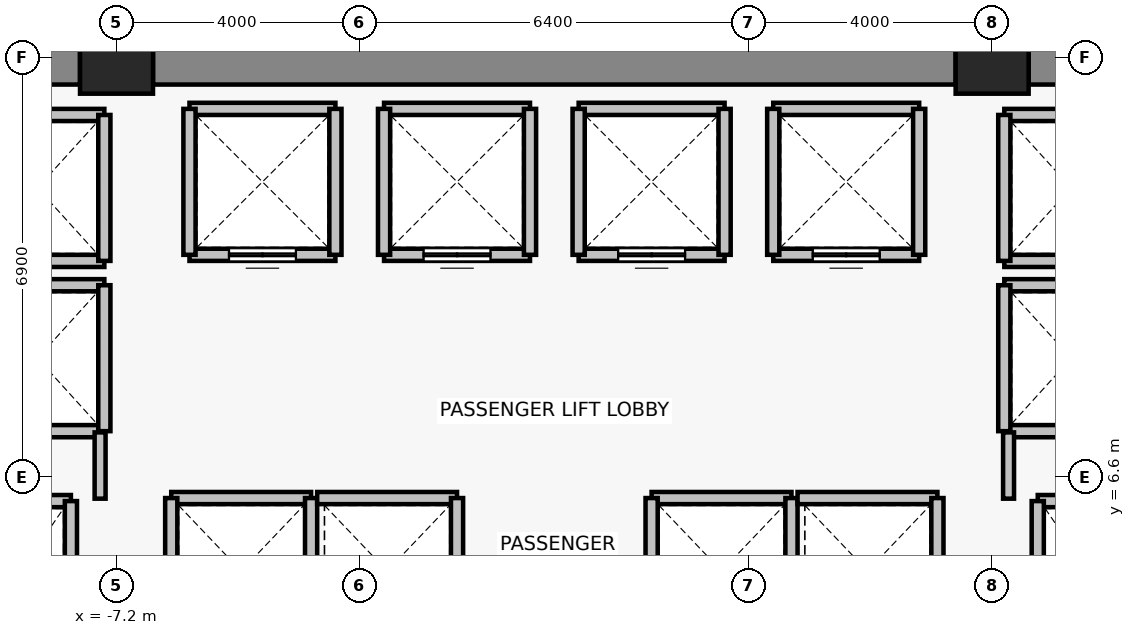
"""IFC4 building model, lengths in metres.
Left out: names, types, materials, properties, quantities, classifications, styles, units other than length and angle.
Written with IfcOpenShell. Run it as: python <this file> out.ifc"""

import sys

from ifc_helpers import new_model, si_unit, direction, frame, frame_2d, origin, origin_2d, place, context, subcontext, project, spatial, rectangle, extrude, source, transform, mapped, element, fill, save


model = new_model("IFC4")
c1 = context("Model", 3, precision=1e-05, world=origin(), true_north=direction((0.0, 1.0)))
c2 = subcontext(c1, "Body", "Model", "MODEL_VIEW")
j1 = project(units=[si_unit("LENGTHUNIT", "METRE"), si_unit("PLANEANGLEUNIT", "RADIAN")], contexts=[c1])
p1 = place(None, origin())
s1 = spatial("IfcSite", under=j1, at=p1, CompositionType="ELEMENT")
p2 = place(p1, origin())
s2 = spatial("IfcBuilding", under=s1, at=p2, CompositionType="ELEMENT")
p3 = place(p2, frame((0.0, 0.0, 70.3)))
s3 = spatial("IfcBuildingStorey", under=s2, at=p3, CompositionType="ELEMENT", Elevation=70.3)
for number, where, z_axis, x_axis in (
    (1, (-7.2, 13.5, 0.0), (0.0, 0.0, 1.0), (1.0, 0.0, 0.0)),
    (2, (7.2, 13.5, 0.0), (0.0, 0.0, 1.0), (1.0, 0.0, 0.0)),
):
    element("IfcColumn", number, at=place(p3, frame(where, z_axis=z_axis, x_axis=x_axis)), inside=s3, PredefinedType="COLUMN", context=c2, shape_type="SweptSolid", body=[
        extrude(rectangle(XDim=1.2, YDim=1.2, at=origin_2d()), origin(), (0.0, 0.0, 1.0), 3.3),
    ])
p4 = place(p3, frame((-13.8, 13.5, 0.0), z_axis=(0.0, 0.0, 1.0), x_axis=(1.0, 0.0, 0.0)))
e3 = element("IfcWall", 3, at=p4, inside=s3, PredefinedType="SHEAR", context=c2, shape_type="SweptSolid", body=[
    extrude(rectangle(XDim=6.0, YDim=0.9, at=frame_2d((3.0, 0.0))), origin(), (0.0, 0.0, 1.0), 3.075),
])
p5 = place(p3, frame((-6.6, 13.5, 0.0), z_axis=(0.0, 0.0, 1.0), x_axis=(1.0, 0.0, 0.0)))
e4 = element("IfcWall", 4, at=p5, inside=s3, PredefinedType="SHEAR", context=c2, shape_type="SweptSolid", body=[
    extrude(rectangle(XDim=13.2, YDim=0.9, at=frame_2d((6.6, 0.0))), origin(), (0.0, 0.0, 1.0), 3.075),
])
p6 = place(p3, frame((7.8, 13.5, 0.0), z_axis=(0.0, 0.0, 1.0), x_axis=(1.0, 0.0, 0.0)))
e5 = element("IfcWall", 5, at=p6, inside=s3, PredefinedType="SHEAR", context=c2, shape_type="SweptSolid", body=[
    extrude(rectangle(XDim=6.0, YDim=0.9, at=frame_2d((3.0, 0.0))), origin(), (0.0, 0.0, 1.0), 3.075),
])
p7 = place(p3, frame((-9.95, 6.2, 0.0), z_axis=(0.0, 0.0, 1.0), x_axis=(1.0, 0.0, 0.0)))
e6 = element("IfcWall", 6, at=p7, inside=s3, PredefinedType="SOLIDWALL", context=c2, shape_type="SweptSolid", body=[
    extrude(rectangle(XDim=2.0, YDim=0.2, at=frame_2d((1.0, 0.0))), origin(), (0.0, 0.0, 1.0), 3.075),
])
p8 = place(p3, frame((-7.95, 6.2, 0.0), z_axis=(0.0, 0.0, 1.0), x_axis=(0.0, -1.0, 0.0)))
e7 = element("IfcWall", 7, at=p8, inside=s3, PredefinedType="SOLIDWALL", context=c2, shape_type="SweptSolid", body=[
    extrude(rectangle(XDim=2.8, YDim=0.2, at=frame_2d((1.4, 0.0))), origin(), (0.0, 0.0, 1.0), 3.075),
])
p9 = place(p3, frame((7.95, 6.2, 0.0), z_axis=(0.0, 0.0, 1.0), x_axis=(1.0, 0.0, 0.0)))
e8 = element("IfcWall", 8, at=p9, inside=s3, PredefinedType="SOLIDWALL", context=c2, shape_type="SweptSolid", body=[
    extrude(rectangle(XDim=2.0, YDim=0.2, at=frame_2d((1.0, 0.0))), origin(), (0.0, 0.0, 1.0), 3.075),
])
p10 = place(p3, frame((7.95, 3.4, 0.0), z_axis=(0.0, 0.0, 1.0), x_axis=(0.0, 1.0, 0.0)))
e9 = element("IfcWall", 9, at=p10, inside=s3, PredefinedType="SOLIDWALL", context=c2, shape_type="SweptSolid", body=[
    extrude(rectangle(XDim=2.8, YDim=0.2, at=frame_2d((1.4, 0.0))), origin(), (0.0, 0.0, 1.0), 3.075),
])
p11 = place(p3, frame((-3.6, 10.25, 0.0), z_axis=(0.0, 0.0, 1.0), x_axis=(-1.0, 0.0, 0.0)))
e10 = element("IfcWall", 10, at=p11, inside=s3, PredefinedType="SOLIDWALL", context=c2, shape_type="SweptSolid", body=[
    extrude(rectangle(XDim=2.4, YDim=0.2, at=frame_2d((1.2, 0.0))), origin(), (0.0, 0.0, 1.0), 3.075),
])
p12 = place(p11, frame((0.65, 0.0, 0.0)))
e11 = element("IfcOpeningElement", 11, at=p12, cuts=e10, PredefinedType="OPENING", context=c2, shape_type="SweptSolid", body=[
    extrude(rectangle(XDim=1.1, YDim=2.2, at=frame_2d((0.55, 1.1))), frame((0.0, 0.11, 0.0), z_axis=(0.0, -1.0, 0.0), x_axis=(1.0, 0.0, 0.0)), (0.0, 0.0, 1.0), 0.22),
])
for number, where, z_axis, x_axis in (
    (12, (-6.0, 12.65, 0.0), (0.0, 0.0, 1.0), (1.0, 0.0, 0.0)),
    (13, (-6.0, 10.25, 0.0), (0.0, 0.0, 1.0), (0.0, 1.0, 0.0)),
    (14, (-3.6, 12.65, 0.0), (0.0, 0.0, 1.0), (0.0, -1.0, 0.0)),
):
    element("IfcWall", number, at=place(p3, frame(where, z_axis=z_axis, x_axis=x_axis)), inside=s3, PredefinedType="SOLIDWALL", context=c2, shape_type="SweptSolid", body=[
        extrude(rectangle(XDim=2.4, YDim=0.2, at=frame_2d((1.2, 0.0))), origin(), (0.0, 0.0, 1.0), 3.075),
    ])
p13 = place(p3, frame((-0.4, 10.25, 0.0), z_axis=(0.0, 0.0, 1.0), x_axis=(-1.0, 0.0, 0.0)))
e15 = element("IfcWall", 15, at=p13, inside=s3, PredefinedType="SOLIDWALL", context=c2, shape_type="SweptSolid", body=[
    extrude(rectangle(XDim=2.4, YDim=0.2, at=frame_2d((1.2, 0.0))), origin(), (0.0, 0.0, 1.0), 3.075),
])
p14 = place(p13, frame((0.65, 0.0, 0.0)))
e16 = element("IfcOpeningElement", 16, at=p14, cuts=e15, PredefinedType="OPENING", context=c2, shape_type="SweptSolid", body=[
    extrude(rectangle(XDim=1.1, YDim=2.2, at=frame_2d((0.55, 1.1))), frame((0.0, 0.11, 0.0), z_axis=(0.0, -1.0, 0.0), x_axis=(1.0, 0.0, 0.0)), (0.0, 0.0, 1.0), 0.22),
])
p15 = place(p3, frame((-2.8, 12.65, 0.0), z_axis=(0.0, 0.0, 1.0), x_axis=(1.0, 0.0, 0.0)))
e17 = element("IfcWall", 17, at=p15, inside=s3, PredefinedType="SOLIDWALL", context=c2, shape_type="SweptSolid", body=[
    extrude(rectangle(XDim=2.4, YDim=0.2, at=frame_2d((1.2, 0.0))), origin(), (0.0, 0.0, 1.0), 3.075),
])
for number, where, z_axis, x_axis in (
    (18, (-2.8, 10.25, 0.0), (0.0, 0.0, 1.0), (0.0, 1.0, 0.0)),
    (19, (-0.4, 12.65, 0.0), (0.0, 0.0, 1.0), (0.0, -1.0, 0.0)),
):
    element("IfcWall", number, at=place(p3, frame(where, z_axis=z_axis, x_axis=x_axis)), inside=s3, PredefinedType="SOLIDWALL", context=c2, shape_type="SweptSolid", body=[
        extrude(rectangle(XDim=2.4, YDim=0.2, at=frame_2d((1.2, 0.0))), origin(), (0.0, 0.0, 1.0), 3.075),
    ])
p16 = place(p3, frame((2.8, 10.25, 0.0), z_axis=(0.0, 0.0, 1.0), x_axis=(-1.0, 0.0, 0.0)))
e20 = element("IfcWall", 20, at=p16, inside=s3, PredefinedType="SOLIDWALL", context=c2, shape_type="SweptSolid", body=[
    extrude(rectangle(XDim=2.4, YDim=0.2, at=frame_2d((1.2, 0.0))), origin(), (0.0, 0.0, 1.0), 3.075),
])
p17 = place(p16, frame((0.65, 0.0, 0.0)))
e21 = element("IfcOpeningElement", 21, at=p17, cuts=e20, PredefinedType="OPENING", context=c2, shape_type="SweptSolid", body=[
    extrude(rectangle(XDim=1.1, YDim=2.2, at=frame_2d((0.55, 1.1))), frame((0.0, 0.11, 0.0), z_axis=(0.0, -1.0, 0.0), x_axis=(1.0, 0.0, 0.0)), (0.0, 0.0, 1.0), 0.22),
])
p18 = place(p3, frame((0.4, 12.65, 0.0), z_axis=(0.0, 0.0, 1.0), x_axis=(1.0, 0.0, 0.0)))
e22 = element("IfcWall", 22, at=p18, inside=s3, PredefinedType="SOLIDWALL", context=c2, shape_type="SweptSolid", body=[
    extrude(rectangle(XDim=2.4, YDim=0.2, at=frame_2d((1.2, 0.0))), origin(), (0.0, 0.0, 1.0), 3.075),
])
for number, where, z_axis, x_axis in (
    (23, (0.4, 10.25, 0.0), (0.0, 0.0, 1.0), (0.0, 1.0, 0.0)),
    (24, (2.8, 12.65, 0.0), (0.0, 0.0, 1.0), (0.0, -1.0, 0.0)),
):
    element("IfcWall", number, at=place(p3, frame(where, z_axis=z_axis, x_axis=x_axis)), inside=s3, PredefinedType="SOLIDWALL", context=c2, shape_type="SweptSolid", body=[
        extrude(rectangle(XDim=2.4, YDim=0.2, at=frame_2d((1.2, 0.0))), origin(), (0.0, 0.0, 1.0), 3.075),
    ])
p19 = place(p3, frame((6.0, 10.25, 0.0), z_axis=(0.0, 0.0, 1.0), x_axis=(-1.0, 0.0, 0.0)))
e25 = element("IfcWall", 25, at=p19, inside=s3, PredefinedType="SOLIDWALL", context=c2, shape_type="SweptSolid", body=[
    extrude(rectangle(XDim=2.4, YDim=0.2, at=frame_2d((1.2, 0.0))), origin(), (0.0, 0.0, 1.0), 3.075),
])
p20 = place(p19, frame((0.65, 0.0, 0.0)))
e26 = element("IfcOpeningElement", 26, at=p20, cuts=e25, PredefinedType="OPENING", context=c2, shape_type="SweptSolid", body=[
    extrude(rectangle(XDim=1.1, YDim=2.2, at=frame_2d((0.55, 1.1))), frame((0.0, 0.11, 0.0), z_axis=(0.0, -1.0, 0.0), x_axis=(1.0, 0.0, 0.0)), (0.0, 0.0, 1.0), 0.22),
])
for number, where, z_axis, x_axis in (
    (27, (3.6, 12.65, 0.0), (0.0, 0.0, 1.0), (1.0, 0.0, 0.0)),
    (28, (3.6, 10.25, 0.0), (0.0, 0.0, 1.0), (0.0, 1.0, 0.0)),
    (29, (6.0, 12.65, 0.0), (0.0, 0.0, 1.0), (0.0, -1.0, 0.0)),
):
    element("IfcWall", number, at=place(p3, frame(where, z_axis=z_axis, x_axis=x_axis)), inside=s3, PredefinedType="SOLIDWALL", context=c2, shape_type="SweptSolid", body=[
        extrude(rectangle(XDim=2.4, YDim=0.2, at=frame_2d((1.2, 0.0))), origin(), (0.0, 0.0, 1.0), 3.075),
    ])
p21 = place(p3, frame((-6.3, 6.25, 0.0), z_axis=(0.0, 0.0, 1.0), x_axis=(1.0, 0.0, 0.0)))
e30 = element("IfcWall", 30, at=p21, inside=s3, PredefinedType="SOLIDWALL", context=c2, shape_type="SweptSolid", body=[
    extrude(rectangle(XDim=2.3, YDim=0.2, at=frame_2d((1.15, 0.0))), origin(), (0.0, 0.0, 1.0), 3.075),
])
for number, where, z_axis, x_axis in (
    (31, (-6.3, 3.85, 0.0), (0.0, 0.0, 1.0), (0.0, 1.0, 0.0)),
    (32, (-4.0, 6.25, 0.0), (0.0, 0.0, 1.0), (0.0, -1.0, 0.0)),
):
    element("IfcWall", number, at=place(p3, frame(where, z_axis=z_axis, x_axis=x_axis)), inside=s3, PredefinedType="SOLIDWALL", context=c2, shape_type="SweptSolid", body=[
        extrude(rectangle(XDim=2.4, YDim=0.2, at=frame_2d((1.2, 0.0))), origin(), (0.0, 0.0, 1.0), 3.075),
    ])
p22 = place(p3, frame((-3.9, 6.25, 0.0), z_axis=(0.0, 0.0, 1.0), x_axis=(1.0, 0.0, 0.0)))
e33 = element("IfcWall", 33, at=p22, inside=s3, PredefinedType="SOLIDWALL", context=c2, shape_type="SweptSolid", body=[
    extrude(rectangle(XDim=2.3, YDim=0.2, at=frame_2d((1.15, 0.0))), origin(), (0.0, 0.0, 1.0), 3.075),
])
p23 = place(p3, frame((-1.6, 6.25, 0.0), z_axis=(0.0, 0.0, 1.0), x_axis=(0.0, -1.0, 0.0)))
e34 = element("IfcWall", 34, at=p23, inside=s3, PredefinedType="SOLIDWALL", context=c2, shape_type="SweptSolid", body=[
    extrude(rectangle(XDim=2.4, YDim=0.2, at=frame_2d((1.2, 0.0))), origin(), (0.0, 0.0, 1.0), 3.075),
])
p24 = place(p3, frame((1.6, 6.25, 0.0), z_axis=(0.0, 0.0, 1.0), x_axis=(1.0, 0.0, 0.0)))
e35 = element("IfcWall", 35, at=p24, inside=s3, PredefinedType="SOLIDWALL", context=c2, shape_type="SweptSolid", body=[
    extrude(rectangle(XDim=2.3, YDim=0.2, at=frame_2d((1.15, 0.0))), origin(), (0.0, 0.0, 1.0), 3.075),
])
for number, where, z_axis, x_axis in (
    (36, (1.6, 3.85, 0.0), (0.0, 0.0, 1.0), (0.0, 1.0, 0.0)),
    (37, (3.9, 6.25, 0.0), (0.0, 0.0, 1.0), (0.0, -1.0, 0.0)),
):
    element("IfcWall", number, at=place(p3, frame(where, z_axis=z_axis, x_axis=x_axis)), inside=s3, PredefinedType="SOLIDWALL", context=c2, shape_type="SweptSolid", body=[
        extrude(rectangle(XDim=2.4, YDim=0.2, at=frame_2d((1.2, 0.0))), origin(), (0.0, 0.0, 1.0), 3.075),
    ])
p25 = place(p3, frame((4.0, 6.25, 0.0), z_axis=(0.0, 0.0, 1.0), x_axis=(1.0, 0.0, 0.0)))
e38 = element("IfcWall", 38, at=p25, inside=s3, PredefinedType="SOLIDWALL", context=c2, shape_type="SweptSolid", body=[
    extrude(rectangle(XDim=2.3, YDim=0.2, at=frame_2d((1.15, 0.0))), origin(), (0.0, 0.0, 1.0), 3.075),
])
p26 = place(p3, frame((6.3, 6.25, 0.0), z_axis=(0.0, 0.0, 1.0), x_axis=(0.0, -1.0, 0.0)))
e39 = element("IfcWall", 39, at=p26, inside=s3, PredefinedType="SOLIDWALL", context=c2, shape_type="SweptSolid", body=[
    extrude(rectangle(XDim=2.4, YDim=0.2, at=frame_2d((1.2, 0.0))), origin(), (0.0, 0.0, 1.0), 3.075),
])
for number, where, z_axis, x_axis in (
    (40, (-7.4, 7.35, 0.0), (0.0, 0.0, 1.0), (-1.0, 0.0, 0.0)),
    (41, (-9.6, 9.75, 0.0), (0.0, 0.0, 1.0), (1.0, 0.0, 0.0)),
):
    element("IfcWall", number, at=place(p3, frame(where, z_axis=z_axis, x_axis=x_axis)), inside=s3, PredefinedType="SOLIDWALL", context=c2, shape_type="SweptSolid", body=[
        extrude(rectangle(XDim=2.2, YDim=0.2, at=frame_2d((1.1, 0.0))), origin(), (0.0, 0.0, 1.0), 2.465),
    ])
p27 = place(p3, frame((-7.4, 9.75, 0.0), z_axis=(0.0, 0.0, 1.0), x_axis=(0.0, -1.0, 0.0)))
e42 = element("IfcWall", 42, at=p27, inside=s3, PredefinedType="SOLIDWALL", context=c2, shape_type="SweptSolid", body=[
    extrude(rectangle(XDim=2.4, YDim=0.2, at=frame_2d((1.2, 0.0))), origin(), (0.0, 0.0, 1.0), 2.465),
])
for number, where, z_axis, x_axis in (
    (43, (-7.4, 10.15, 0.0), (0.0, 0.0, 1.0), (-1.0, 0.0, 0.0)),
    (44, (-9.6, 12.55, 0.0), (0.0, 0.0, 1.0), (1.0, 0.0, 0.0)),
):
    element("IfcWall", number, at=place(p3, frame(where, z_axis=z_axis, x_axis=x_axis)), inside=s3, PredefinedType="SOLIDWALL", context=c2, shape_type="SweptSolid", body=[
        extrude(rectangle(XDim=2.2, YDim=0.2, at=frame_2d((1.1, 0.0))), origin(), (0.0, 0.0, 1.0), 2.465),
    ])
p28 = place(p3, frame((-7.4, 12.55, 0.0), z_axis=(0.0, 0.0, 1.0), x_axis=(0.0, -1.0, 0.0)))
e45 = element("IfcWall", 45, at=p28, inside=s3, PredefinedType="SOLIDWALL", context=c2, shape_type="SweptSolid", body=[
    extrude(rectangle(XDim=2.4, YDim=0.2, at=frame_2d((1.2, 0.0))), origin(), (0.0, 0.0, 1.0), 2.465),
])
for number, where, z_axis, x_axis in (
    (46, (9.6, 7.35, 0.0), (0.0, 0.0, 1.0), (-1.0, 0.0, 0.0)),
    (47, (7.4, 9.75, 0.0), (0.0, 0.0, 1.0), (1.0, 0.0, 0.0)),
):
    element("IfcWall", number, at=place(p3, frame(where, z_axis=z_axis, x_axis=x_axis)), inside=s3, PredefinedType="SOLIDWALL", context=c2, shape_type="SweptSolid", body=[
        extrude(rectangle(XDim=2.2, YDim=0.2, at=frame_2d((1.1, 0.0))), origin(), (0.0, 0.0, 1.0), 2.465),
    ])
p29 = place(p3, frame((7.4, 7.35, 0.0), z_axis=(0.0, 0.0, 1.0), x_axis=(0.0, 1.0, 0.0)))
e48 = element("IfcWall", 48, at=p29, inside=s3, PredefinedType="SOLIDWALL", context=c2, shape_type="SweptSolid", body=[
    extrude(rectangle(XDim=2.4, YDim=0.2, at=frame_2d((1.2, 0.0))), origin(), (0.0, 0.0, 1.0), 2.465),
])
for number, where, z_axis, x_axis in (
    (49, (9.6, 10.15, 0.0), (0.0, 0.0, 1.0), (-1.0, 0.0, 0.0)),
    (50, (7.4, 12.55, 0.0), (0.0, 0.0, 1.0), (1.0, 0.0, 0.0)),
):
    element("IfcWall", number, at=place(p3, frame(where, z_axis=z_axis, x_axis=x_axis)), inside=s3, PredefinedType="SOLIDWALL", context=c2, shape_type="SweptSolid", body=[
        extrude(rectangle(XDim=2.2, YDim=0.2, at=frame_2d((1.1, 0.0))), origin(), (0.0, 0.0, 1.0), 2.465),
    ])
p30 = place(p3, frame((7.4, 10.15, 0.0), z_axis=(0.0, 0.0, 1.0), x_axis=(0.0, 1.0, 0.0)))
e51 = element("IfcWall", 51, at=p30, inside=s3, PredefinedType="SOLIDWALL", context=c2, shape_type="SweptSolid", body=[
    extrude(rectangle(XDim=2.4, YDim=0.2, at=frame_2d((1.2, 0.0))), origin(), (0.0, 0.0, 1.0), 2.465),
])
for number, where, z_axis, x_axis in (
    (52, (-7.47, 7.33, 0.0), (0.0, 0.0, 1.0), (0.0, -1.0, 0.0)),
    (53, (7.47, 6.24, 0.0), (0.0, 0.0, 1.0), (0.0, 1.0, 0.0)),
):
    element("IfcWall", number, at=place(p3, frame(where, z_axis=z_axis, x_axis=x_axis)), inside=s3, PredefinedType="PARTITIONING", context=c2, shape_type="SweptSolid", body=[
        extrude(rectangle(XDim=1.09, YDim=0.18, at=frame_2d((0.545, 0.0))), origin(), (0.0, 0.0, 1.0), 2.465),
    ])
m1 = source(origin(), c2, "Body", "SweptSolid", [
    extrude(rectangle(XDim=1.1, YDim=2.2, at=frame_2d((0.55, 1.1))), frame((0.0, 0.025, 0.0), z_axis=(0.0, -1.0, 0.0), x_axis=(1.0, 0.0, 0.0)), (0.0, 0.0, 1.0), 0.05),
])
p31 = place(p12, origin())
e54 = element("IfcDoor", 54, at=p31, inside=s3, OperationType="DOUBLE_DOOR_SLIDING", PredefinedType="DOOR", context=c2, shape_type="MappedRepresentation", body=[
    mapped(m1, transform((0.0, 0.0, 0.0), x_axis=(1.0, 0.0, 0.0), y_axis=(0.0, 1.0, 0.0), z_axis=(0.0, 0.0, 1.0), scale=1.0)),
])
fill(e11, e54)
p32 = place(p14, origin())
e55 = element("IfcDoor", 55, at=p32, inside=s3, OperationType="DOUBLE_DOOR_SLIDING", PredefinedType="DOOR", context=c2, shape_type="MappedRepresentation", body=[
    mapped(m1, transform((0.0, 0.0, 0.0), x_axis=(1.0, 0.0, 0.0), y_axis=(0.0, 1.0, 0.0), z_axis=(0.0, 0.0, 1.0), scale=1.0)),
])
fill(e16, e55)
p33 = place(p17, origin())
e56 = element("IfcDoor", 56, at=p33, inside=s3, OperationType="DOUBLE_DOOR_SLIDING", PredefinedType="DOOR", context=c2, shape_type="MappedRepresentation", body=[
    mapped(m1, transform((0.0, 0.0, 0.0), x_axis=(1.0, 0.0, 0.0), y_axis=(0.0, 1.0, 0.0), z_axis=(0.0, 0.0, 1.0), scale=1.0)),
])
fill(e21, e56)
p34 = place(p20, origin())
e57 = element("IfcDoor", 57, at=p34, inside=s3, OperationType="DOUBLE_DOOR_SLIDING", PredefinedType="DOOR", context=c2, shape_type="MappedRepresentation", body=[
    mapped(m1, transform((0.0, 0.0, 0.0), x_axis=(1.0, 0.0, 0.0), y_axis=(0.0, 1.0, 0.0), z_axis=(0.0, 0.0, 1.0), scale=1.0)),
])
fill(e26, e57)
save(model, sys.argv[1])
